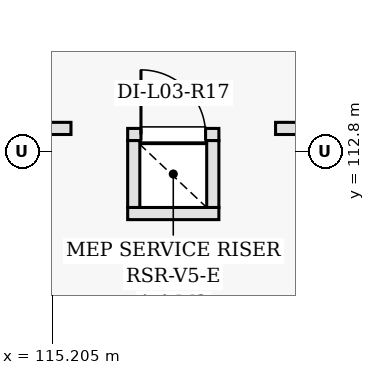
"""IFC4 building model, lengths in metres.
Left out: names, types, materials, properties, quantities, classifications, styles, units other than length and angle.
Written with IfcOpenShell. Run it as: python <this file> out.ifc"""

import sys

from ifc_helpers import new_model, si_unit, direction, frame, frame_2d, origin, place, context, subcontext, project, spatial, rectangle, extrude, element, fill, save


model = new_model("IFC4")
c1 = context("Model", 3, precision=1e-05, world=origin(), true_north=direction((0.0, 1.0)))
c2 = subcontext(c1, "Body", "Model", "MODEL_VIEW")
j1 = project(units=[si_unit("LENGTHUNIT", "METRE"), si_unit("PLANEANGLEUNIT", "RADIAN")], contexts=[c1])
p1 = place(None, origin())
s1 = spatial("IfcSite", under=j1, at=p1, CompositionType="ELEMENT")
p2 = place(p1, origin())
s2 = spatial("IfcBuilding", under=s1, at=p2, CompositionType="ELEMENT")
p3 = place(p2, frame((0.0, 0.0, 13.8)))
s3 = spatial("IfcBuildingStorey", under=s2, at=p3, CompositionType="ELEMENT", Elevation=13.8)
p4 = place(p3, frame((116.2, 111.98, 0.0), z_axis=(0.0, 0.0, 1.0), x_axis=(1.0, 0.0, 0.0)))
e1 = element("IfcWall", 1, at=p4, inside=s3, PredefinedType="PARTITIONING", context=c2, shape_type="SweptSolid", body=[
    extrude(rectangle(XDim=1.2, YDim=0.16, at=frame_2d((0.6, 0.0))), origin(), (0.0, 0.0, 1.0), 3.98),
])
p5 = place(p3, frame((116.2, 113.02, 0.0), z_axis=(0.0, 0.0, 1.0), x_axis=(1.0, 0.0, 0.0)))
e2 = element("IfcWall", 2, at=p5, inside=s3, PredefinedType="PARTITIONING", context=c2, shape_type="SweptSolid", body=[
    extrude(rectangle(XDim=1.2, YDim=0.16, at=frame_2d((0.6, 0.0))), origin(), (0.0, 0.0, 1.0), 3.98),
])
p6 = place(p5, frame((0.175, 0.0, 0.0)))
e3 = element("IfcOpeningElement", 3, at=p6, cuts=e2, PredefinedType="OPENING", context=c2, shape_type="SweptSolid", body=[
    extrude(rectangle(XDim=0.85, YDim=2.02, at=frame_2d((0.425, 1.01))), frame((0.0, 0.09, 0.0), z_axis=(0.0, -1.0, 0.0), x_axis=(1.0, 0.0, 0.0)), (0.0, 0.0, 1.0), 0.18),
])
for number, where, z_axis, x_axis in (
    (4, (116.28, 112.06, 0.0), (0.0, 0.0, 1.0), (0.0, 1.0, 0.0)),
    (5, (117.32, 112.06, 0.0), (0.0, 0.0, 1.0), (0.0, 1.0, 0.0)),
):
    element("IfcWall", number, at=place(p3, frame(where, z_axis=z_axis, x_axis=x_axis)), inside=s3, PredefinedType="PARTITIONING", context=c2, shape_type="SweptSolid", body=[
        extrude(rectangle(XDim=0.88, YDim=0.16, at=frame_2d((0.44, 0.0))), origin(), (0.0, 0.0, 1.0), 3.98),
    ])
p7 = place(p3, frame((118.146, 113.1, 0.0), z_axis=(0.0, 0.0, 1.0), x_axis=(1.0, 0.0, 0.0)))
e6 = element("IfcWall", 6, at=p7, inside=s3, PredefinedType="PARTITIONING", context=c2, shape_type="SweptSolid", body=[
    extrude(rectangle(XDim=20.999, YDim=0.16, at=frame_2d((10.5, 0.0))), origin(), (0.0, 0.0, 1.0), 3.195),
])
p8 = place(p7, frame((9.6, 0.0, 0.0)))
e7 = element("IfcOpeningElement", 7, at=p8, cuts=e6, PredefinedType="OPENING", context=c2, shape_type="SweptSolid", body=[
    extrude(rectangle(XDim=1.8, YDim=2.2, at=frame_2d((0.9, 1.1))), frame((0.0, 0.09, 0.0), z_axis=(0.0, -1.0, 0.0), x_axis=(1.0, 0.0, 0.0)), (0.0, 0.0, 1.0), 0.18),
])
p9 = place(p3, frame((102.487, 113.1, 0.0), z_axis=(0.0, 0.0, 1.0), x_axis=(1.0, 0.0, 0.0)))
e8 = element("IfcWall", 8, at=p9, inside=s3, PredefinedType="PARTITIONING", context=c2, shape_type="SweptSolid", body=[
    extrude(rectangle(XDim=12.967, YDim=0.16, at=frame_2d((6.483, 0.0))), origin(), (0.0, 0.0, 1.0), 3.045),
])
p10 = place(p6, origin())
e9 = element("IfcDoor", 9, at=p10, inside=s3, OperationType="SINGLE_SWING_LEFT", PredefinedType="DOOR", context=c2, shape_type="SweptSolid", body=[
    extrude(rectangle(XDim=0.85, YDim=2.02, at=frame_2d((0.425, 1.01))), frame((0.0, 0.025, 0.0), z_axis=(0.0, -1.0, 0.0), x_axis=(1.0, 0.0, 0.0)), (0.0, 0.0, 1.0), 0.05),
])
fill(e3, e9)
save(model, sys.argv[1])
